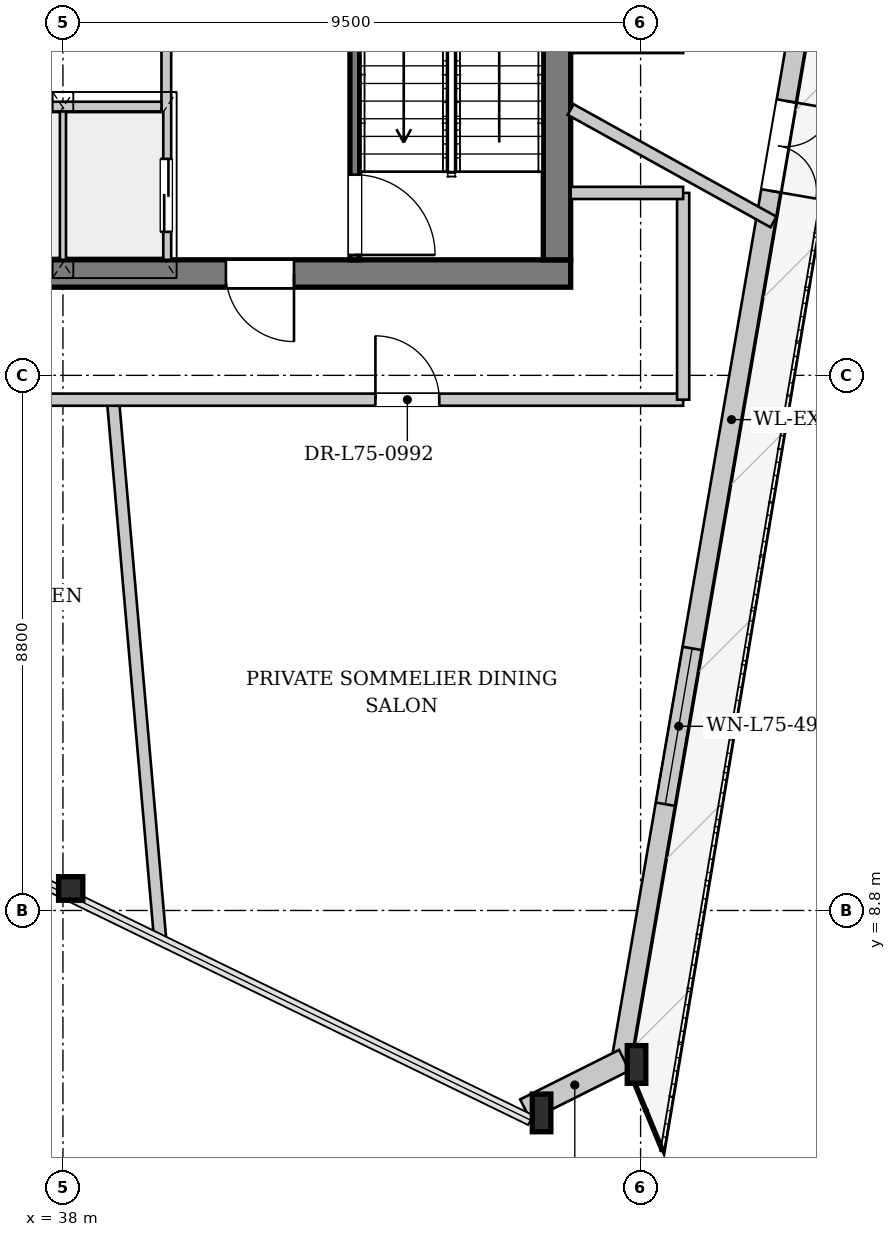
"""IFC4 building model, lengths in metres.
Left out: names, types, materials, properties, quantities, classifications, styles, units other than length and angle.
Written with IfcOpenShell. Run it as: python <this file> out.ifc"""

import sys

from ifc_helpers import new_model, si_unit, direction, frame, frame_2d, origin, origin_2d, place, context, subcontext, project, spatial, rectangle, i_section, extrude, source, transform, mapped, element, fill, save


model = new_model("IFC4")
c1 = context("Model", 3, precision=1e-05, world=origin(), true_north=direction((0.0, 1.0)))
c2 = subcontext(c1, "Body", "Model", "MODEL_VIEW")
j1 = project(units=[si_unit("LENGTHUNIT", "METRE"), si_unit("PLANEANGLEUNIT", "RADIAN")], contexts=[c1])
p1 = place(None, origin())
s1 = spatial("IfcSite", under=j1, at=p1, CompositionType="ELEMENT")
p2 = place(p1, origin())
s2 = spatial("IfcBuilding", under=s1, at=p2, CompositionType="ELEMENT")
p3 = place(p2, frame((0.0, 0.0, 281.9)))
s3 = spatial("IfcBuildingStorey", under=s2, at=p3, CompositionType="ELEMENT", Elevation=281.9)
m1 = source(origin(), c2, "Body", "SweptSolid", [
    extrude(i_section(OverallWidth=0.398, OverallDepth=0.387, WebThickness=0.019, FlangeThickness=0.029, at=origin_2d()), origin(), (0.0, 0.0, 1.0), 3.949),
])
p4 = place(p3, frame((37.969, 9.108, 0.0), z_axis=(0.080241513705, 0.02720051312, 0.996404251077), x_axis=(-0.321039281158, 0.947065879416, 0.0)))
e1 = element("IfcColumn", 1, at=p4, inside=s3, PredefinedType="COLUMN", context=c2, shape_type="MappedRepresentation", body=[
    mapped(m1, transform((0.0, 0.0, 0.0), x_axis=(1.0, 0.0, 0.0), y_axis=(0.0, 1.0, 0.0), z_axis=(0.0, 0.0, 1.0), scale=1.0)),
])
m2 = source(origin(), c2, "Body", "SweptSolid", [
    extrude(i_section(OverallWidth=0.305, OverallDepth=0.62, WebThickness=0.021, FlangeThickness=0.04, at=origin_2d()), origin(), (0.0, 0.0, 1.0), 3.959),
])
p5 = place(p3, frame((45.69, 5.353, 0.0), z_axis=(0.091887262438, 0.059572547325, 0.99398583622), x_axis=(-0.543998260544, 0.839086343903, 0.0)))
e2 = element("IfcColumn", 2, at=p5, inside=s3, PredefinedType="COLUMN", context=c2, shape_type="MappedRepresentation", body=[
    mapped(m2, transform((0.0, 0.0, 0.0), x_axis=(1.0, 0.0, 0.0), y_axis=(0.0, 1.0, 0.0), z_axis=(0.0, 0.0, 1.0), scale=1.0)),
])
m3 = source(origin(), c2, "Body", "SweptSolid", [
    extrude(i_section(OverallWidth=0.305, OverallDepth=0.62, WebThickness=0.021, FlangeThickness=0.04, at=origin_2d()), origin(), (0.0, 0.0, 1.0), 3.947),
])
p6 = place(p3, frame((47.316, 6.167, 0.0), z_axis=(0.059317030489, 0.050781315987, 0.996946712638), x_axis=(-0.650334618995, 0.759647867986, 0.0)))
e3 = element("IfcColumn", 3, at=p6, inside=s3, PredefinedType="COLUMN", context=c2, shape_type="MappedRepresentation", body=[
    mapped(m3, transform((0.0, 0.0, 0.0), x_axis=(1.0, 0.0, 0.0), y_axis=(0.0, 1.0, 0.0), z_axis=(0.0, 0.0, 1.0), scale=1.0)),
])
p7 = place(p3, frame((50.887, 27.865, 0.0), z_axis=(0.0, 0.0, 1.0), x_axis=(-0.169551460744, -0.985521335213, 0.0)))
e4 = element("IfcWall", 4, at=p7, inside=s3, PredefinedType="SOLIDWALL", context=c2, shape_type="SweptSolid", body=[
    extrude(rectangle(XDim=21.989, YDim=0.32, at=frame_2d((10.995, 0.0))), origin(), (0.0, 0.0, 1.0), 3.462),
])
p8 = place(p7, frame((5.837, 0.0, 0.0)))
e5 = element("IfcOpeningElement", 5, at=p8, cuts=e4, PredefinedType="OPENING", context=c2, shape_type="SweptSolid", body=[
    extrude(rectangle(XDim=1.5, YDim=2.3, at=frame_2d((0.75, 1.15))), frame((0.0, 0.17, 0.0), z_axis=(0.0, -1.0, 0.0), x_axis=(1.0, 0.0, 0.0)), (0.0, 0.0, 1.0), 0.34),
])
p9 = place(p7, frame((14.972, 0.0, 0.65)))
e6 = element("IfcOpeningElement", 6, at=p9, cuts=e4, PredefinedType="OPENING", context=c2, shape_type="SweptSolid", body=[
    extrude(rectangle(XDim=2.6, YDim=2.35, at=frame_2d((1.3, 1.175))), frame((0.0, 0.17, 0.0), z_axis=(0.0, -1.0, 0.0), x_axis=(1.0, 0.0, 0.0)), (0.0, 0.0, 1.0), 0.34),
])
p10 = place(p3, frame((47.231, 6.337, 0.0), z_axis=(0.0, 0.0, 1.0), x_axis=(-0.894131681519, -0.44780412694, 0.0)))
e7 = element("IfcWall", 7, at=p10, inside=s3, PredefinedType="SOLIDWALL", context=c2, shape_type="SweptSolid", body=[
    extrude(rectangle(XDim=1.819, YDim=0.38, at=frame_2d((0.909, 0.0))), origin(), (0.0, 0.0, 1.0), 3.462),
])
p11 = place(p3, frame((46.35, 19.275, 0.0), z_axis=(0.0, 0.0, 1.0), x_axis=(-1.0, 0.0, 0.0)))
e8 = element("IfcWall", 8, at=p11, inside=s3, PredefinedType="SHEAR", context=c2, shape_type="SweptSolid", body=[
    extrude(rectangle(XDim=16.7, YDim=0.45, at=frame_2d((8.35, 0.0))), origin(), (0.0, 0.0, 1.0), 3.92),
])
p12 = place(p11, frame((4.55, 0.0, 0.0)))
e9 = element("IfcOpeningElement", 9, at=p12, cuts=e8, PredefinedType="OPENING", context=c2, shape_type="SweptSolid", body=[
    extrude(rectangle(XDim=1.12, YDim=2.25, at=frame_2d((0.56, 1.125))), frame((0.0, 0.235, 0.0), z_axis=(0.0, -1.0, 0.0), x_axis=(1.0, 0.0, 0.0)), (0.0, 0.0, 1.0), 0.47),
])
p13 = place(p11, frame((11.05, 0.0, 0.0)))
e10 = element("IfcOpeningElement", 10, at=p13, cuts=e8, PredefinedType="OPENING", context=c2, shape_type="SweptSolid", body=[
    extrude(rectangle(XDim=1.12, YDim=2.25, at=frame_2d((0.56, 1.125))), frame((0.0, 0.235, 0.0), z_axis=(0.0, -1.0, 0.0), x_axis=(1.0, 0.0, 0.0)), (0.0, 0.0, 1.0), 0.47),
])
p14 = place(p3, frame((46.125, 33.7, 0.0), z_axis=(0.0, 0.0, 1.0), x_axis=(0.0, -1.0, 0.0)))
e11 = element("IfcWall", 11, at=p14, inside=s3, PredefinedType="SHEAR", context=c2, shape_type="SweptSolid", body=[
    extrude(rectangle(XDim=14.2, YDim=0.45, at=frame_2d((7.1, 0.0))), origin(), (0.0, 0.0, 1.0), 3.92),
])
p15 = place(p14, frame((5.18, 0.0, 0.0)))
e12 = element("IfcOpeningElement", 12, at=p15, cuts=e11, PredefinedType="OPENING", context=c2, shape_type="SweptSolid", body=[
    extrude(rectangle(XDim=1.6, YDim=2.2, at=frame_2d((0.8, 1.1))), frame((0.0, 0.235, 0.0), z_axis=(0.0, -1.0, 0.0), x_axis=(1.0, 0.0, 0.0)), (0.0, 0.0, 1.0), 0.47),
])
p16 = place(p14, frame((2.05, 0.0, 0.0)))
e13 = element("IfcOpeningElement", 13, at=p16, cuts=e11, PredefinedType="OPENING", context=c2, shape_type="SweptSolid", body=[
    extrude(rectangle(XDim=0.95, YDim=2.1, at=frame_2d((0.475, 1.05))), frame((0.0, 0.235, 0.0), z_axis=(0.0, -1.0, 0.0), x_axis=(1.0, 0.0, 0.0)), (0.0, 0.0, 1.0), 0.47),
])
p17 = place(p3, frame((42.8, 26.96, 0.0), z_axis=(0.0, 0.0, 1.0), x_axis=(0.0, -1.0, 0.0)))
e14 = element("IfcWall", 14, at=p17, inside=s3, PredefinedType="PARTITIONING", context=c2, shape_type="SweptSolid", body=[
    extrude(rectangle(XDim=7.46, YDim=0.16, at=frame_2d((3.73, 0.0))), origin(), (0.0, 0.0, 1.0), 3.92),
])
p18 = place(p17, frame((6.06, 0.0, 0.0)))
e15 = element("IfcOpeningElement", 15, at=p18, cuts=e14, PredefinedType="OPENING", context=c2, shape_type="SweptSolid", body=[
    extrude(rectangle(XDim=1.32, YDim=2.2, at=frame_2d((0.66, 1.1))), frame((0.0, 0.09, 0.0), z_axis=(0.0, -1.0, 0.0), x_axis=(1.0, 0.0, 0.0)), (0.0, 0.0, 1.0), 0.18),
])
p19 = place(p3, frame((39.7, 24.28, 0.0), z_axis=(0.0, 0.0, 1.0), x_axis=(0.0, -1.0, 0.0)))
e16 = element("IfcWall", 16, at=p19, inside=s3, PredefinedType="PARTITIONING", context=c2, shape_type="SweptSolid", body=[
    extrude(rectangle(XDim=4.78, YDim=0.16, at=frame_2d((2.39, 0.0))), origin(), (0.0, 0.0, 1.0), 3.92),
])
p20 = place(p19, frame((3.12, 0.0, 0.0)))
e17 = element("IfcOpeningElement", 17, at=p20, cuts=e16, PredefinedType="OPENING", context=c2, shape_type="SweptSolid", body=[
    extrude(rectangle(XDim=1.2, YDim=2.2, at=frame_2d((0.6, 1.1))), frame((0.0, 0.09, 0.0), z_axis=(0.0, -1.0, 0.0), x_axis=(1.0, 0.0, 0.0)), (0.0, 0.0, 1.0), 0.18),
])
p21 = place(p3, frame((38.0, 19.5, 0.0), z_axis=(0.0, 0.0, 1.0), x_axis=(0.0, 1.0, 0.0)))
e18 = element("IfcWall", 18, at=p21, inside=s3, PredefinedType="PARTITIONING", context=c2, shape_type="SweptSolid", body=[
    extrude(rectangle(XDim=2.46, YDim=0.125, at=frame_2d((1.23, 0.0))), origin(), (0.0, 0.0, 1.0), 3.92),
])
p22 = place(p3, frame((36.38, 22.02, 0.0), z_axis=(0.0, 0.0, 1.0), x_axis=(1.0, 0.0, 0.0)))
e19 = element("IfcWall", 19, at=p22, inside=s3, PredefinedType="PARTITIONING", context=c2, shape_type="SweptSolid", body=[
    extrude(rectangle(XDim=3.24, YDim=0.16, at=frame_2d((1.62, 0.0))), origin(), (0.0, 0.0, 1.0), 3.92),
])
p23 = place(p3, frame((38.823, 17.2, 0.0), z_axis=(0.0, 0.0, 1.0), x_axis=(0.087143086854, -0.996195805258, 0.0)))
e20 = element("IfcWall", 20, at=p23, inside=s3, PredefinedType="PARTITIONING", context=c2, shape_type="SweptSolid", body=[
    extrude(rectangle(XDim=8.884, YDim=0.2, at=frame_2d((4.442, 0.0))), origin(), (0.0, 0.0, 1.0), 3.92),
])
p24 = place(p3, frame((46.35, 21.971, 0.0), z_axis=(0.0, 0.0, 1.0), x_axis=(0.874624795307, -0.484800440835, 0.0)))
e21 = element("IfcWall", 21, at=p24, inside=s3, PredefinedType="PARTITIONING", context=c2, shape_type="SweptSolid", body=[
    extrude(rectangle(XDim=3.815, YDim=0.2, at=frame_2d((1.907, 0.0))), origin(), (0.0, 0.0, 1.0), 3.92),
])
p25 = place(p3, frame((27.8, 17.2, 0.0), z_axis=(0.0, 0.0, 1.0), x_axis=(1.0, 0.0, 0.0)))
e22 = element("IfcWall", 22, at=p25, inside=s3, PredefinedType="PARTITIONING", context=c2, shape_type="SweptSolid", body=[
    extrude(rectangle(XDim=20.4, YDim=0.2, at=frame_2d((10.2, 0.0))), origin(), (0.0, 0.0, 1.0), 3.92),
])
p26 = place(p25, frame((5.209, 0.0, 0.0)))
e23 = element("IfcOpeningElement", 23, at=p26, cuts=e22, PredefinedType="OPENING", context=c2, shape_type="SweptSolid", body=[
    extrude(rectangle(XDim=1.05, YDim=2.2, at=frame_2d((0.525, 1.1))), frame((0.0, 0.11, 0.0), z_axis=(0.0, -1.0, 0.0), x_axis=(1.0, 0.0, 0.0)), (0.0, 0.0, 1.0), 0.22),
])
p27 = place(p25, frame((15.339, 0.0, 0.0)))
e24 = element("IfcOpeningElement", 24, at=p27, cuts=e22, PredefinedType="OPENING", context=c2, shape_type="SweptSolid", body=[
    extrude(rectangle(XDim=1.05, YDim=2.2, at=frame_2d((0.525, 1.1))), frame((0.0, 0.11, 0.0), z_axis=(0.0, -1.0, 0.0), x_axis=(1.0, 0.0, 0.0)), (0.0, 0.0, 1.0), 0.22),
])
p28 = place(p3, frame((48.2, 17.2, 0.0), z_axis=(0.0, 0.0, 1.0), x_axis=(0.0, 1.0, 0.0)))
e25 = element("IfcWall", 25, at=p28, inside=s3, PredefinedType="PARTITIONING", context=c2, shape_type="SweptSolid", body=[
    extrude(rectangle(XDim=3.4, YDim=0.2, at=frame_2d((1.7, 0.0))), origin(), (0.0, 0.0, 1.0), 3.92),
])
for number, where, z_axis, x_axis in (
    (26, (46.35, 20.6, 0.0), (0.0, 0.0, 1.0), (1.0, 0.0, 0.0)),
    (27, (46.35, 23.0, 0.0), (0.0, 0.0, 1.0), (1.0, 0.0, 0.0)),
):
    element("IfcWall", number, at=place(p3, frame(where, z_axis=z_axis, x_axis=x_axis)), inside=s3, PredefinedType="PARTITIONING", context=c2, shape_type="SweptSolid", body=[
        extrude(rectangle(XDim=1.85, YDim=0.2, at=frame_2d((0.925, 0.0))), origin(), (0.0, 0.0, 1.0), 3.92),
    ])
m4 = source(origin(), c2, "Body", "SweptSolid", [
    extrude(rectangle(XDim=1.5, YDim=2.3, at=frame_2d((0.75, 1.15))), frame((0.0, 0.025, 0.0), z_axis=(0.0, -1.0, 0.0), x_axis=(1.0, 0.0, 0.0)), (0.0, 0.0, 1.0), 0.05),
])
p29 = place(p8, origin())
e28 = element("IfcDoor", 28, at=p29, inside=s3, OperationType="DOUBLE_DOOR_SINGLE_SWING", PredefinedType="DOOR", context=c2, shape_type="MappedRepresentation", body=[
    mapped(m4, transform((0.0, 0.0, 0.0), x_axis=(1.0, 0.0, 0.0), y_axis=(0.0, 1.0, 0.0), z_axis=(0.0, 0.0, 1.0), scale=1.0)),
])
fill(e5, e28)
m5 = source(origin(), c2, "Body", "SweptSolid", [
    extrude(rectangle(XDim=2.6, YDim=2.35, at=frame_2d((1.3, 1.175))), frame((0.0, 0.03, 0.0), z_axis=(0.0, -1.0, 0.0), x_axis=(1.0, 0.0, 0.0)), (0.0, 0.0, 1.0), 0.06),
])
p30 = place(p9, origin())
e29 = element("IfcWindow", 29, at=p30, inside=s3, PartitioningType="SINGLE_PANEL", PredefinedType="WINDOW", context=c2, shape_type="MappedRepresentation", body=[
    mapped(m5, transform((0.0, 0.0, 0.0), x_axis=(1.0, 0.0, 0.0), y_axis=(0.0, 1.0, 0.0), z_axis=(0.0, 0.0, 1.0), scale=1.0)),
])
fill(e6, e29)
m6 = source(origin(), c2, "Body", "SweptSolid", [
    extrude(rectangle(XDim=1.12, YDim=2.25, at=frame_2d((0.56, 1.125))), frame((0.0, 0.025, 0.0), z_axis=(0.0, -1.0, 0.0), x_axis=(1.0, 0.0, 0.0)), (0.0, 0.0, 1.0), 0.05),
])
p31 = place(p12, origin())
e30 = element("IfcDoor", 30, at=p31, inside=s3, OperationType="SINGLE_SWING_LEFT", PredefinedType="DOOR", context=c2, shape_type="MappedRepresentation", body=[
    mapped(m6, transform((0.0, 0.0, 0.0), x_axis=(1.0, 0.0, 0.0), y_axis=(0.0, 1.0, 0.0), z_axis=(0.0, 0.0, 1.0), scale=1.0)),
])
fill(e9, e30)
m7 = source(origin(), c2, "Body", "SweptSolid", [
    extrude(rectangle(XDim=1.32, YDim=2.2, at=frame_2d((0.66, 1.1))), frame((0.0, 0.025, 0.0), z_axis=(0.0, -1.0, 0.0), x_axis=(1.0, 0.0, 0.0)), (0.0, 0.0, 1.0), 0.05),
])
p32 = place(p18, origin())
e31 = element("IfcDoor", 31, at=p32, inside=s3, OperationType="SINGLE_SWING_RIGHT", PredefinedType="DOOR", context=c2, shape_type="MappedRepresentation", body=[
    mapped(m7, transform((0.0, 0.0, 0.0), x_axis=(1.0, 0.0, 0.0), y_axis=(0.0, 1.0, 0.0), z_axis=(0.0, 0.0, 1.0), scale=1.0)),
])
fill(e15, e31)
m8 = source(origin(), c2, "Body", "SweptSolid", [
    extrude(rectangle(XDim=1.2, YDim=2.2, at=frame_2d((0.6, 1.1))), frame((0.0, 0.025, 0.0), z_axis=(0.0, -1.0, 0.0), x_axis=(1.0, 0.0, 0.0)), (0.0, 0.0, 1.0), 0.05),
])
p33 = place(p20, origin())
e32 = element("IfcDoor", 32, at=p33, inside=s3, OperationType="DOUBLE_DOOR_SLIDING", PredefinedType="DOOR", context=c2, shape_type="MappedRepresentation", body=[
    mapped(m8, transform((0.0, 0.0, 0.0), x_axis=(1.0, 0.0, 0.0), y_axis=(0.0, 1.0, 0.0), z_axis=(0.0, 0.0, 1.0), scale=1.0)),
])
fill(e17, e32)
m9 = source(origin(), c2, "Body", "SweptSolid", [
    extrude(rectangle(XDim=1.05, YDim=2.2, at=frame_2d((0.525, 1.1))), frame((0.0, 0.025, 0.0), z_axis=(0.0, -1.0, 0.0), x_axis=(1.0, 0.0, 0.0)), (0.0, 0.0, 1.0), 0.05),
])
p34 = place(p27, origin())
e33 = element("IfcDoor", 33, at=p34, inside=s3, OperationType="SINGLE_SWING_LEFT", PredefinedType="DOOR", context=c2, shape_type="MappedRepresentation", body=[
    mapped(m9, transform((0.0, 0.0, 0.0), x_axis=(1.0, 0.0, 0.0), y_axis=(0.0, 1.0, 0.0), z_axis=(0.0, 0.0, 1.0), scale=1.0)),
])
fill(e24, e33)
save(model, sys.argv[1])
